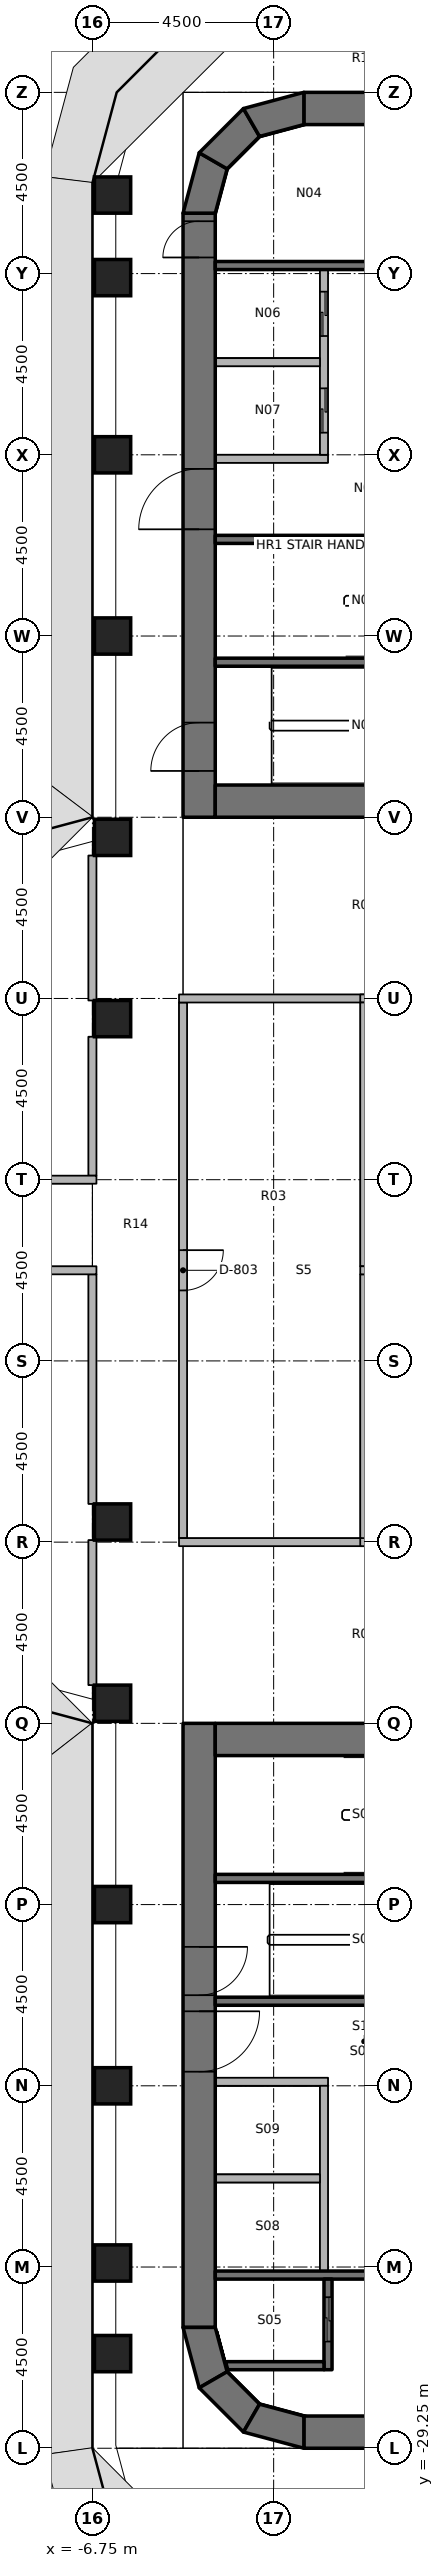
"""IFC4 building model, lengths in metres.
Left out: names, types, materials, properties, quantities, classifications, styles, units other than length and angle.
Written with IfcOpenShell. Run it as: python <this file> out.ifc"""

import sys

from ifc_helpers import new_model, si_unit, direction, frame, frame_2d, origin, origin_2d, place, context, subcontext, project, spatial, polyline, rectangle, outline, extrude, element, fill, save


model = new_model("IFC4")
c1 = context("Model", 3, precision=1e-05, world=origin(), true_north=direction((0.0, 1.0)))
c2 = subcontext(c1, "Body", "Model", "MODEL_VIEW")
j1 = project(units=[si_unit("LENGTHUNIT", "METRE"), si_unit("PLANEANGLEUNIT", "RADIAN")], contexts=[c1])
p1 = place(None, origin())
s1 = spatial("IfcSite", under=j1, at=p1, CompositionType="ELEMENT")
p2 = place(p1, origin())
s2 = spatial("IfcBuilding", under=s1, at=p2, CompositionType="ELEMENT")
p3 = place(p2, frame((0.0, 0.0, 98.0)))
s3 = spatial("IfcBuildingStorey", under=s2, at=p3, CompositionType="ELEMENT", Elevation=98.0)
for number, where, z_axis, x_axis in (
    (1, (-6.25, -26.9, 0.0), (0.0, 0.0, 1.0), (1.0, 0.0, 0.0)),
    (2, (-6.25, -24.65, 0.0), (0.0, 0.0, 1.0), (1.0, 0.0, 0.0)),
    (3, (-6.25, -20.25, 0.0), (0.0, 0.0, 1.0), (1.0, 0.0, 0.0)),
    (4, (-6.25, -15.75, 0.0), (0.0, 0.0, 1.0), (1.0, 0.0, 0.0)),
    (5, (-6.25, -10.75, 0.0), (0.0, 0.0, 1.0), (1.0, 0.0, 0.0)),
    (6, (-6.25, -6.25, 0.0), (0.0, 0.0, 1.0), (1.0, 0.0, 0.0)),
    (7, (-6.25, 6.25, 0.0), (0.0, 0.0, 1.0), (1.0, 0.0, 0.0)),
    (8, (-6.25, 10.75, 0.0), (0.0, 0.0, 1.0), (1.0, 0.0, 0.0)),
    (9, (-6.25, 15.75, 0.0), (0.0, 0.0, 1.0), (1.0, 0.0, 0.0)),
    (10, (-6.25, 20.25, 0.0), (0.0, 0.0, 1.0), (1.0, 0.0, 0.0)),
    (11, (-6.25, 24.65, 0.0), (0.0, 0.0, 1.0), (1.0, 0.0, 0.0)),
    (12, (-6.25, 26.7, 0.0), (0.0, 0.0, 1.0), (1.0, 0.0, 0.0)),
):
    element("IfcColumn", number, at=place(p3, frame(where, z_axis=z_axis, x_axis=x_axis)), inside=s3, PredefinedType="COLUMN", context=c2, shape_type="SweptSolid", body=[
        extrude(rectangle(XDim=0.9, YDim=0.9, at=origin_2d()), origin(), (0.0, 0.0, 1.0), 3.65),
    ])
p4 = place(p3, frame((-4.1, 11.25, 0.0), z_axis=(0.0, 0.0, 1.0), x_axis=(0.0, 1.0, 0.0)))
e13 = element("IfcWall", 13, at=p4, inside=s3, PredefinedType="SHEAR", context=c2, shape_type="SweptSolid", body=[
    extrude(rectangle(XDim=15.0, YDim=0.8, at=frame_2d((7.5, 0.0))), origin(), (0.0, 0.0, 1.0), 3.8),
])
p5 = place(p4, frame((7.15, 0.0, 0.0)))
e14 = element("IfcOpeningElement", 14, at=p5, cuts=e13, PredefinedType="OPENING", context=c2, shape_type="SweptSolid", body=[
    extrude(rectangle(XDim=1.5, YDim=2.3, at=frame_2d((0.75, 1.15))), frame((0.0, 0.41, 0.0), z_axis=(0.0, -1.0, 0.0), x_axis=(1.0, 0.0, 0.0)), (0.0, 0.0, 1.0), 0.82),
])
p6 = place(p4, frame((13.9, 0.0, 0.0)))
e15 = element("IfcOpeningElement", 15, at=p6, cuts=e13, PredefinedType="OPENING", context=c2, shape_type="SweptSolid", body=[
    extrude(rectangle(XDim=0.9, YDim=2.1, at=frame_2d((0.45, 1.05))), frame((0.0, 0.41, 0.0), z_axis=(0.0, -1.0, 0.0), x_axis=(1.0, 0.0, 0.0)), (0.0, 0.0, 1.0), 0.82),
])
p7 = place(p4, frame((1.15, 0.0, 0.0)))
e16 = element("IfcOpeningElement", 16, at=p7, cuts=e13, PredefinedType="OPENING", context=c2, shape_type="SweptSolid", body=[
    extrude(rectangle(XDim=1.2, YDim=2.1, at=frame_2d((0.6, 1.05))), frame((0.0, 0.41, 0.0), z_axis=(0.0, -1.0, 0.0), x_axis=(1.0, 0.0, 0.0)), (0.0, 0.0, 1.0), 0.82),
])
p8 = place(p3, frame((-3.7, 11.65, 0.0), z_axis=(0.0, 0.0, 1.0), x_axis=(1.0, 0.0, 0.0)))
e17 = element("IfcWall", 17, at=p8, inside=s3, PredefinedType="SHEAR", context=c2, shape_type="SweptSolid", body=[
    extrude(rectangle(XDim=7.4, YDim=0.8, at=frame_2d((3.7, 0.0))), origin(), (0.0, 0.0, 1.0), 3.8),
])
p9 = place(p3, frame((-1.5, 28.85, 0.0), z_axis=(0.0, 0.0, 1.0), x_axis=(1.0, 0.0, 0.0)))
e18 = element("IfcWall", 18, at=p9, inside=s3, PredefinedType="SHEAR", context=c2, shape_type="SweptSolid", body=[
    extrude(rectangle(XDim=3.0, YDim=0.8, at=frame_2d((1.5, 0.0))), origin(), (0.0, 0.0, 1.0), 3.8),
])
p10 = place(p3, origin())
e19 = element("IfcWall", 19, at=p10, inside=s3, PredefinedType="SHEAR", context=c2, shape_type="SweptSolid", body=[
    extrude(outline(polyline([(-4.5, 26.25), (-4.098, 27.75), (-3.405, 27.35), (-3.7, 26.25), (-4.5, 26.25)])), origin(), (0.0, 0.0, 1.0), 3.8),
])
p11 = place(p3, origin())
e20 = element("IfcWall", 20, at=p11, inside=s3, PredefinedType="SHEAR", context=c2, shape_type="SweptSolid", body=[
    extrude(outline(polyline([(-4.098, 27.75), (-3.0, 28.848), (-2.6, 28.155), (-3.405, 27.35), (-4.098, 27.75)])), origin(), (0.0, 0.0, 1.0), 3.8),
])
p12 = place(p3, origin())
e21 = element("IfcWall", 21, at=p12, inside=s3, PredefinedType="SHEAR", context=c2, shape_type="SweptSolid", body=[
    extrude(outline(polyline([(-3.0, 28.848), (-1.5, 29.25), (-1.5, 28.45), (-2.6, 28.155), (-3.0, 28.848)])), origin(), (0.0, 0.0, 1.0), 3.8),
])
p13 = place(p3, frame((-4.1, -11.25, 0.0), z_axis=(0.0, 0.0, 1.0), x_axis=(0.0, -1.0, 0.0)))
e22 = element("IfcWall", 22, at=p13, inside=s3, PredefinedType="SHEAR", context=c2, shape_type="SweptSolid", body=[
    extrude(rectangle(XDim=15.0, YDim=0.8, at=frame_2d((7.5, 0.0))), origin(), (0.0, 0.0, 1.0), 3.8),
])
p14 = place(p13, frame((7.15, 0.0, 0.0)))
e23 = element("IfcOpeningElement", 23, at=p14, cuts=e22, PredefinedType="OPENING", context=c2, shape_type="SweptSolid", body=[
    extrude(rectangle(XDim=1.5, YDim=2.3, at=frame_2d((0.75, 1.15))), frame((0.0, 0.41, 0.0), z_axis=(0.0, -1.0, 0.0), x_axis=(1.0, 0.0, 0.0)), (0.0, 0.0, 1.0), 0.82),
])
p15 = place(p13, frame((5.55, 0.0, 0.0)))
e24 = element("IfcOpeningElement", 24, at=p15, cuts=e22, PredefinedType="OPENING", context=c2, shape_type="SweptSolid", body=[
    extrude(rectangle(XDim=1.2, YDim=2.1, at=frame_2d((0.6, 1.05))), frame((0.0, 0.41, 0.0), z_axis=(0.0, -1.0, 0.0), x_axis=(1.0, 0.0, 0.0)), (0.0, 0.0, 1.0), 0.82),
])
p16 = place(p3, frame((-3.7, -11.65, 0.0), z_axis=(0.0, 0.0, 1.0), x_axis=(1.0, 0.0, 0.0)))
e25 = element("IfcWall", 25, at=p16, inside=s3, PredefinedType="SHEAR", context=c2, shape_type="SweptSolid", body=[
    extrude(rectangle(XDim=7.4, YDim=0.8, at=frame_2d((3.7, 0.0))), origin(), (0.0, 0.0, 1.0), 3.8),
])
p17 = place(p3, frame((-1.5, -28.85, 0.0), z_axis=(0.0, 0.0, 1.0), x_axis=(1.0, 0.0, 0.0)))
e26 = element("IfcWall", 26, at=p17, inside=s3, PredefinedType="SHEAR", context=c2, shape_type="SweptSolid", body=[
    extrude(rectangle(XDim=3.0, YDim=0.8, at=frame_2d((1.5, 0.0))), origin(), (0.0, 0.0, 1.0), 3.8),
])
p18 = place(p3, origin())
e27 = element("IfcWall", 27, at=p18, inside=s3, PredefinedType="SHEAR", context=c2, shape_type="SweptSolid", body=[
    extrude(outline(polyline([(-4.5, -26.25), (-4.098, -27.75), (-3.405, -27.35), (-3.7, -26.25), (-4.5, -26.25)])), origin(), (0.0, 0.0, 1.0), 3.8),
])
p19 = place(p3, origin())
e28 = element("IfcWall", 28, at=p19, inside=s3, PredefinedType="SHEAR", context=c2, shape_type="SweptSolid", body=[
    extrude(outline(polyline([(-4.098, -27.75), (-3.0, -28.848), (-2.6, -28.155), (-3.405, -27.35), (-4.098, -27.75)])), origin(), (0.0, 0.0, 1.0), 3.8),
])
p20 = place(p3, origin())
e29 = element("IfcWall", 29, at=p20, inside=s3, PredefinedType="SHEAR", context=c2, shape_type="SweptSolid", body=[
    extrude(outline(polyline([(-3.0, -28.848), (-1.5, -29.25), (-1.5, -28.45), (-2.6, -28.155), (-3.0, -28.848)])), origin(), (0.0, 0.0, 1.0), 3.8),
])
for number, where, z_axis, x_axis in (
    (30, (-3.7, 24.95, 0.0), (0.0, 0.0, 1.0), (1.0, 0.0, 0.0)),
    (31, (-3.7, 18.15, 0.0), (0.0, 0.0, 1.0), (1.0, 0.0, 0.0)),
    (32, (-3.7, 15.1, 0.0), (0.0, 0.0, 1.0), (1.0, 0.0, 0.0)),
):
    element("IfcWall", number, at=place(p3, frame(where, z_axis=z_axis, x_axis=x_axis)), inside=s3, PredefinedType="SHEAR", context=c2, shape_type="SweptSolid", body=[
        extrude(rectangle(XDim=7.4, YDim=0.2, at=frame_2d((3.7, 0.0))), origin(), (0.0, 0.0, 1.0), 3.65),
    ])
p21 = place(p3, frame((-3.7, 20.15, 0.0), z_axis=(0.0, 0.0, 1.0), x_axis=(1.0, 0.0, 0.0)))
e33 = element("IfcWall", 33, at=p21, inside=s3, PredefinedType="PARTITIONING", context=c2, shape_type="SweptSolid", body=[
    extrude(rectangle(XDim=2.8, YDim=0.2, at=frame_2d((1.4, 0.0))), origin(), (0.0, 0.0, 1.0), 3.65),
])
p22 = place(p3, frame((-1.0, 24.85, 0.0), z_axis=(0.0, 0.0, 1.0), x_axis=(0.0, -1.0, 0.0)))
e34 = element("IfcWall", 34, at=p22, inside=s3, PredefinedType="PARTITIONING", context=c2, shape_type="SweptSolid", body=[
    extrude(rectangle(XDim=4.6, YDim=0.2, at=frame_2d((2.3, 0.0))), origin(), (0.0, 0.0, 1.0), 3.65),
])
p23 = place(p22, frame((0.55, 0.0, 0.0)))
e35 = element("IfcOpeningElement", 35, at=p23, cuts=e34, PredefinedType="OPENING", context=c2, shape_type="SweptSolid", body=[
    extrude(rectangle(XDim=1.1, YDim=2.3, at=frame_2d((0.55, 1.15))), frame((0.0, 0.11, 0.0), z_axis=(0.0, -1.0, 0.0), x_axis=(1.0, 0.0, 0.0)), (0.0, 0.0, 1.0), 0.22),
])
p24 = place(p22, frame((2.95, 0.0, 0.0)))
e36 = element("IfcOpeningElement", 36, at=p24, cuts=e34, PredefinedType="OPENING", context=c2, shape_type="SweptSolid", body=[
    extrude(rectangle(XDim=1.1, YDim=2.3, at=frame_2d((0.55, 1.15))), frame((0.0, 0.11, 0.0), z_axis=(0.0, -1.0, 0.0), x_axis=(1.0, 0.0, 0.0)), (0.0, 0.0, 1.0), 0.22),
])
p25 = place(p3, frame((-3.7, 22.55, 0.0), z_axis=(0.0, 0.0, 1.0), x_axis=(1.0, 0.0, 0.0)))
e37 = element("IfcWall", 37, at=p25, inside=s3, PredefinedType="PARTITIONING", context=c2, shape_type="SweptSolid", body=[
    extrude(rectangle(XDim=2.6, YDim=0.2, at=frame_2d((1.3, 0.0))), origin(), (0.0, 0.0, 1.0), 3.65),
])
p26 = place(p3, frame((3.7, -24.95, 0.0), z_axis=(0.0, 0.0, 1.0), x_axis=(-1.0, 0.0, 0.0)))
e38 = element("IfcWall", 38, at=p26, inside=s3, PredefinedType="SHEAR", context=c2, shape_type="SweptSolid", body=[
    extrude(rectangle(XDim=7.4, YDim=0.2, at=frame_2d((3.7, 0.0))), origin(), (0.0, 0.0, 1.0), 3.65),
])
p27 = place(p3, frame((-0.9, -27.3, 0.0), z_axis=(0.0, 0.0, 1.0), x_axis=(0.0, 1.0, 0.0)))
e39 = element("IfcWall", 39, at=p27, inside=s3, PredefinedType="SHEAR", context=c2, shape_type="SweptSolid", body=[
    extrude(rectangle(XDim=2.25, YDim=0.2, at=frame_2d((1.125, 0.0))), origin(), (0.0, 0.0, 1.0), 3.65),
])
p28 = place(p27, frame((0.7, 0.0, 0.0)))
e40 = element("IfcOpeningElement", 40, at=p28, cuts=e39, PredefinedType="OPENING", context=c2, shape_type="SweptSolid", body=[
    extrude(rectangle(XDim=1.1, YDim=2.3, at=frame_2d((0.55, 1.15))), frame((0.0, 0.11, 0.0), z_axis=(0.0, -1.0, 0.0), x_axis=(1.0, 0.0, 0.0)), (0.0, 0.0, 1.0), 0.22),
])
p29 = place(p3, origin())
e41 = element("IfcWall", 41, at=p29, inside=s3, PredefinedType="SHEAR", context=c2, shape_type="SweptSolid", body=[
    extrude(outline(polyline([(-1.0, -27.1), (-3.444, -27.1), (-3.39, -27.3), (-1.0, -27.3), (-1.0, -27.1)])), origin(), (0.0, 0.0, 1.0), 3.65),
])
for number, where, z_axis, x_axis in (
    (42, (3.7, -18.15, 0.0), (0.0, 0.0, 1.0), (-1.0, 0.0, 0.0)),
    (43, (3.7, -15.1, 0.0), (0.0, 0.0, 1.0), (-1.0, 0.0, 0.0)),
):
    element("IfcWall", number, at=place(p3, frame(where, z_axis=z_axis, x_axis=x_axis)), inside=s3, PredefinedType="SHEAR", context=c2, shape_type="SweptSolid", body=[
        extrude(rectangle(XDim=7.4, YDim=0.2, at=frame_2d((3.7, 0.0))), origin(), (0.0, 0.0, 1.0), 3.65),
    ])
p30 = place(p3, frame((-0.9, -20.15, 0.0), z_axis=(0.0, 0.0, 1.0), x_axis=(-1.0, 0.0, 0.0)))
e44 = element("IfcWall", 44, at=p30, inside=s3, PredefinedType="PARTITIONING", context=c2, shape_type="SweptSolid", body=[
    extrude(rectangle(XDim=2.8, YDim=0.2, at=frame_2d((1.4, 0.0))), origin(), (0.0, 0.0, 1.0), 3.65),
])
p31 = place(p3, frame((-1.0, -24.85, 0.0), z_axis=(0.0, 0.0, 1.0), x_axis=(0.0, 1.0, 0.0)))
e45 = element("IfcWall", 45, at=p31, inside=s3, PredefinedType="PARTITIONING", context=c2, shape_type="SweptSolid", body=[
    extrude(rectangle(XDim=4.6, YDim=0.2, at=frame_2d((2.3, 0.0))), origin(), (0.0, 0.0, 1.0), 3.65),
])
p32 = place(p3, frame((-1.1, -22.55, 0.0), z_axis=(0.0, 0.0, 1.0), x_axis=(-1.0, 0.0, 0.0)))
e46 = element("IfcWall", 46, at=p32, inside=s3, PredefinedType="PARTITIONING", context=c2, shape_type="SweptSolid", body=[
    extrude(rectangle(XDim=2.6, YDim=0.2, at=frame_2d((1.3, 0.0))), origin(), (0.0, 0.0, 1.0), 3.65),
])
p33 = place(p3, frame((-4.5, 6.65, 0.0), z_axis=(0.0, 0.0, 1.0), x_axis=(0.0, -1.0, 0.0)))
e47 = element("IfcWall", 47, at=p33, inside=s3, PredefinedType="PARTITIONING", context=c2, shape_type="SweptSolid", body=[
    extrude(rectangle(XDim=13.3, YDim=0.2, at=frame_2d((6.65, 0.0))), origin(), (0.0, 0.0, 1.0), 2.738),
])
p34 = place(p33, frame((6.15, 0.0, 0.0)))
e48 = element("IfcOpeningElement", 48, at=p34, cuts=e47, PredefinedType="OPENING", context=c2, shape_type="SweptSolid", body=[
    extrude(rectangle(XDim=1.0, YDim=2.1, at=frame_2d((0.5, 1.05))), frame((0.0, 0.11, 0.0), z_axis=(0.0, -1.0, 0.0), x_axis=(1.0, 0.0, 0.0)), (0.0, 0.0, 1.0), 0.22),
])
p35 = place(p3, frame((-6.75, 2.35, 0.0), z_axis=(0.0, 0.0, 1.0), x_axis=(0.0, 1.0, 0.0)))
e49 = element("IfcWall", 49, at=p35, inside=s3, PredefinedType="PARTITIONING", context=c2, shape_type="SweptSolid", body=[
    extrude(rectangle(XDim=3.45, YDim=0.2, at=frame_2d((1.725, 0.0))), origin(), (0.0, 0.0, 1.0), 2.738),
])
for number, where, z_axis, x_axis in (
    (50, (-6.75, 6.7, 0.0), (0.0, 0.0, 1.0), (0.0, 1.0, 0.0)),
    (51, (-6.75, -10.3, 0.0), (0.0, 0.0, 1.0), (0.0, 1.0, 0.0)),
):
    element("IfcWall", number, at=place(p3, frame(where, z_axis=z_axis, x_axis=x_axis)), inside=s3, PredefinedType="PARTITIONING", context=c2, shape_type="SweptSolid", body=[
        extrude(rectangle(XDim=3.6, YDim=0.2, at=frame_2d((1.8, 0.0))), origin(), (0.0, 0.0, 1.0), 2.738),
    ])
p36 = place(p3, frame((-6.75, -5.8, 0.0), z_axis=(0.0, 0.0, 1.0), x_axis=(0.0, 1.0, 0.0)))
e52 = element("IfcWall", 52, at=p36, inside=s3, PredefinedType="PARTITIONING", context=c2, shape_type="SweptSolid", body=[
    extrude(rectangle(XDim=5.7, YDim=0.2, at=frame_2d((2.85, 0.0))), origin(), (0.0, 0.0, 1.0), 2.738),
])
for number, where, z_axis, x_axis in (
    (53, (-4.6, 6.75, 0.0), (0.0, 0.0, 1.0), (1.0, 0.0, 0.0)),
    (54, (-0.1, 6.75, 0.0), (0.0, 0.0, 1.0), (1.0, 0.0, 0.0)),
    (55, (-4.6, -6.75, 0.0), (0.0, 0.0, 1.0), (1.0, 0.0, 0.0)),
    (56, (-0.1, -6.75, 0.0), (0.0, 0.0, 1.0), (1.0, 0.0, 0.0)),
):
    element("IfcWall", number, at=place(p3, frame(where, z_axis=z_axis, x_axis=x_axis)), inside=s3, PredefinedType="PARTITIONING", context=c2, shape_type="SweptSolid", body=[
        extrude(rectangle(XDim=4.7, YDim=0.2, at=frame_2d((2.35, 0.0))), origin(), (0.0, 0.0, 1.0), 2.738),
    ])
for number, where, z_axis, x_axis in (
    (57, (0.0, 0.1, 0.0), (0.0, 0.0, 1.0), (0.0, 1.0, 0.0)),
    (58, (0.0, -6.65, 0.0), (0.0, 0.0, 1.0), (0.0, 1.0, 0.0)),
):
    element("IfcWall", number, at=place(p3, frame(where, z_axis=z_axis, x_axis=x_axis)), inside=s3, PredefinedType="PARTITIONING", context=c2, shape_type="SweptSolid", body=[
        extrude(rectangle(XDim=6.55, YDim=0.2, at=frame_2d((3.275, 0.0))), origin(), (0.0, 0.0, 1.0), 2.738),
    ])
p37 = place(p3, frame((-0.1, 0.0, 0.0), z_axis=(0.0, 0.0, 1.0), x_axis=(1.0, 0.0, 0.0)))
e59 = element("IfcWall", 59, at=p37, inside=s3, PredefinedType="PARTITIONING", context=c2, shape_type="SweptSolid", body=[
    extrude(rectangle(XDim=4.7, YDim=0.2, at=frame_2d((2.35, 0.0))), origin(), (0.0, 0.0, 1.0), 2.738),
])
p38 = place(p3, frame((-11.35, 2.25, 0.0), z_axis=(0.0, 0.0, 1.0), x_axis=(1.0, 0.0, 0.0)))
e60 = element("IfcWall", 60, at=p38, inside=s3, PredefinedType="PARTITIONING", context=c2, shape_type="SweptSolid", body=[
    extrude(rectangle(XDim=4.7, YDim=0.2, at=frame_2d((2.35, 0.0))), origin(), (0.0, 0.0, 1.0), 2.738),
])
p39 = place(p38, frame((1.85, 0.0, 0.0)))
e61 = element("IfcOpeningElement", 61, at=p39, cuts=e60, PredefinedType="OPENING", context=c2, shape_type="SweptSolid", body=[
    extrude(rectangle(XDim=1.0, YDim=2.1, at=frame_2d((0.5, 1.05))), frame((0.0, 0.11, 0.0), z_axis=(0.0, -1.0, 0.0), x_axis=(1.0, 0.0, 0.0)), (0.0, 0.0, 1.0), 0.22),
])
p40 = place(p3, frame((-6.65, 0.0, 0.0), z_axis=(0.0, 0.0, 1.0), x_axis=(-1.0, 0.0, 0.0)))
e62 = element("IfcWall", 62, at=p40, inside=s3, PredefinedType="PARTITIONING", context=c2, shape_type="SweptSolid", body=[
    extrude(rectangle(XDim=4.7, YDim=0.2, at=frame_2d((2.35, 0.0))), origin(), (0.0, 0.0, 1.0), 2.738),
])
p41 = place(p40, frame((1.85, 0.0, 0.0)))
e63 = element("IfcOpeningElement", 63, at=p41, cuts=e62, PredefinedType="OPENING", context=c2, shape_type="SweptSolid", body=[
    extrude(rectangle(XDim=1.0, YDim=2.1, at=frame_2d((0.5, 1.05))), frame((0.0, 0.11, 0.0), z_axis=(0.0, -1.0, 0.0), x_axis=(1.0, 0.0, 0.0)), (0.0, 0.0, 1.0), 0.22),
])
p42 = place(p5, origin())
e64 = element("IfcDoor", 64, at=p42, inside=s3, OperationType="DOUBLE_DOOR_SINGLE_SWING", PredefinedType="DOOR", context=c2, shape_type="SweptSolid", body=[
    extrude(rectangle(XDim=1.5, YDim=2.3, at=frame_2d((0.75, 1.15))), frame((0.0, 0.025, 0.0), z_axis=(0.0, -1.0, 0.0), x_axis=(1.0, 0.0, 0.0)), (0.0, 0.0, 1.0), 0.05),
])
fill(e14, e64)
p43 = place(p6, origin())
e65 = element("IfcDoor", 65, at=p43, inside=s3, OperationType="SINGLE_SWING_LEFT", PredefinedType="DOOR", context=c2, shape_type="SweptSolid", body=[
    extrude(rectangle(XDim=0.9, YDim=2.1, at=frame_2d((0.45, 1.05))), frame((0.0, 0.025, 0.0), z_axis=(0.0, -1.0, 0.0), x_axis=(1.0, 0.0, 0.0)), (0.0, 0.0, 1.0), 0.05),
])
fill(e15, e65)
p44 = place(p7, origin())
e66 = element("IfcDoor", 66, at=p44, inside=s3, OperationType="SINGLE_SWING_LEFT", PredefinedType="DOOR", context=c2, shape_type="SweptSolid", body=[
    extrude(rectangle(XDim=1.2, YDim=2.1, at=frame_2d((0.6, 1.05))), frame((0.0, 0.025, 0.0), z_axis=(0.0, -1.0, 0.0), x_axis=(1.0, 0.0, 0.0)), (0.0, 0.0, 1.0), 0.05),
])
fill(e16, e66)
p45 = place(p23, origin())
e67 = element("IfcDoor", 67, at=p45, inside=s3, OperationType="DOUBLE_DOOR_SLIDING", PredefinedType="DOOR", context=c2, shape_type="SweptSolid", body=[
    extrude(rectangle(XDim=1.1, YDim=2.3, at=frame_2d((0.55, 1.15))), frame((0.0, 0.025, 0.0), z_axis=(0.0, -1.0, 0.0), x_axis=(1.0, 0.0, 0.0)), (0.0, 0.0, 1.0), 0.05),
])
fill(e35, e67)
p46 = place(p24, origin())
e68 = element("IfcDoor", 68, at=p46, inside=s3, OperationType="DOUBLE_DOOR_SLIDING", PredefinedType="DOOR", context=c2, shape_type="SweptSolid", body=[
    extrude(rectangle(XDim=1.1, YDim=2.3, at=frame_2d((0.55, 1.15))), frame((0.0, 0.025, 0.0), z_axis=(0.0, -1.0, 0.0), x_axis=(1.0, 0.0, 0.0)), (0.0, 0.0, 1.0), 0.05),
])
fill(e36, e68)
p47 = place(p14, origin())
e69 = element("IfcDoor", 69, at=p47, inside=s3, OperationType="DOUBLE_DOOR_SINGLE_SWING", PredefinedType="DOOR", context=c2, shape_type="SweptSolid", body=[
    extrude(rectangle(XDim=1.5, YDim=2.3, at=frame_2d((0.75, 1.15))), frame((0.0, 0.025, 0.0), z_axis=(0.0, -1.0, 0.0), x_axis=(1.0, 0.0, 0.0)), (0.0, 0.0, 1.0), 0.05),
])
fill(e23, e69)
p48 = place(p15, origin())
e70 = element("IfcDoor", 70, at=p48, inside=s3, OperationType="SINGLE_SWING_LEFT", PredefinedType="DOOR", context=c2, shape_type="SweptSolid", body=[
    extrude(rectangle(XDim=1.2, YDim=2.1, at=frame_2d((0.6, 1.05))), frame((0.0, 0.025, 0.0), z_axis=(0.0, -1.0, 0.0), x_axis=(1.0, 0.0, 0.0)), (0.0, 0.0, 1.0), 0.05),
])
fill(e24, e70)
p49 = place(p28, origin())
e71 = element("IfcDoor", 71, at=p49, inside=s3, OperationType="DOUBLE_DOOR_SLIDING", PredefinedType="DOOR", context=c2, shape_type="SweptSolid", body=[
    extrude(rectangle(XDim=1.1, YDim=2.3, at=frame_2d((0.55, 1.15))), frame((0.0, 0.025, 0.0), z_axis=(0.0, -1.0, 0.0), x_axis=(1.0, 0.0, 0.0)), (0.0, 0.0, 1.0), 0.05),
])
fill(e40, e71)
p50 = place(p34, origin())
e72 = element("IfcDoor", 72, at=p50, inside=s3, OperationType="SINGLE_SWING_RIGHT", PredefinedType="DOOR", context=c2, shape_type="SweptSolid", body=[
    extrude(rectangle(XDim=1.0, YDim=2.1, at=frame_2d((0.5, 1.05))), frame((0.0, 0.025, 0.0), z_axis=(0.0, -1.0, 0.0), x_axis=(1.0, 0.0, 0.0)), (0.0, 0.0, 1.0), 0.05),
])
fill(e48, e72)
save(model, sys.argv[1])
